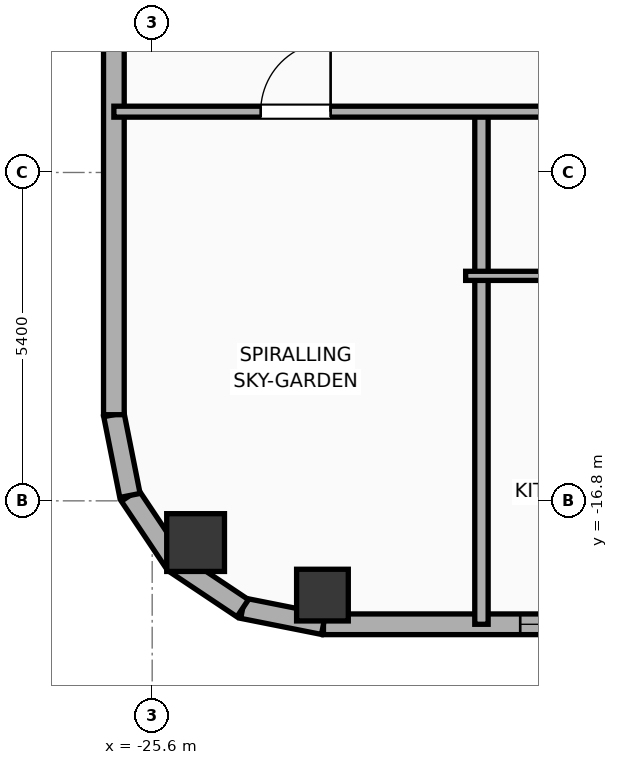
"""IFC4 building model, lengths in metres.
Left out: names, types, materials, properties, quantities, classifications, styles, units other than length and angle.
Written with IfcOpenShell. Run it as: python <this file> out.ifc"""

import sys

from ifc_helpers import new_model, si_unit, direction, frame, frame_2d, origin, origin_2d, place, context, subcontext, project, spatial, rectangle, hollow_rectangle, hollow_circle, extrude, element, fill, save


model = new_model("IFC4")
c1 = context("Model", 3, precision=1e-05, world=origin(), true_north=direction((0.0, 1.0)))
c2 = subcontext(c1, "Body", "Model", "MODEL_VIEW")
j1 = project(units=[si_unit("LENGTHUNIT", "METRE"), si_unit("PLANEANGLEUNIT", "RADIAN")], contexts=[c1])
p1 = place(None, origin())
s1 = spatial("IfcSite", under=j1, at=p1, CompositionType="ELEMENT")
p2 = place(p1, origin())
s2 = spatial("IfcBuilding", under=s1, at=p2, CompositionType="ELEMENT")
p3 = place(p2, frame((0.0, 0.0, 208.0)))
s3 = spatial("IfcBuildingStorey", under=s2, at=p3, CompositionType="ELEMENT", Elevation=208.0)
p4 = place(p3, frame((-22.8, -18.35, 0.0), z_axis=(0.0, 0.0, 1.0), x_axis=(1.0, 0.0, 0.0)))
e1 = element("IfcColumn", 1, at=p4, inside=s3, PredefinedType="COLUMN", context=c2, shape_type="SweptSolid", body=[
    extrude(hollow_rectangle(XDim=0.85, YDim=0.85, WallThickness=0.028, at=origin_2d()), origin(), (0.0, 0.0, 1.0), 3.9),
])
p5 = place(p3, frame((-24.886, -17.486, 0.0), z_axis=(0.0, 0.0, 1.0), x_axis=(1.0, 0.0, 0.0)))
e2 = element("IfcColumn", 2, at=p5, inside=s3, PredefinedType="COLUMN", context=c2, shape_type="SweptSolid", body=[
    extrude(hollow_circle(Radius=0.475, WallThickness=0.032, at=origin_2d()), origin(), (0.0, 0.0, 1.0), 3.9),
])
p6 = place(p3, frame((-13.861, -18.83, 0.0), z_axis=(0.0, 0.0, 1.0), x_axis=(-1.0, 0.0, 0.0)))
e3 = element("IfcWall", 3, at=p6, inside=s3, PredefinedType="ELEMENTEDWALL", context=c2, shape_type="SweptSolid", body=[
    extrude(rectangle(XDim=8.922, YDim=0.34, at=frame_2d((4.461, 0.0))), origin(), (0.0, 0.0, 1.0), 3.65),
])
p7 = place(p6, frame((1.769, 0.0, 0.75)))
e4 = element("IfcOpeningElement", 4, at=p7, cuts=e3, PredefinedType="OPENING", context=c2, shape_type="SweptSolid", body=[
    extrude(rectangle(XDim=1.2, YDim=2.05, at=frame_2d((0.6, 1.025))), frame((0.0, 0.18, 0.0), z_axis=(0.0, -1.0, 0.0), x_axis=(1.0, 0.0, 0.0)), (0.0, 0.0, 1.0), 0.36),
])
p8 = place(p6, frame((4.486, 0.0, 0.75)))
e5 = element("IfcOpeningElement", 5, at=p8, cuts=e3, PredefinedType="OPENING", context=c2, shape_type="SweptSolid", body=[
    extrude(rectangle(XDim=1.2, YDim=2.05, at=frame_2d((0.6, 1.025))), frame((0.0, 0.18, 0.0), z_axis=(0.0, -1.0, 0.0), x_axis=(1.0, 0.0, 0.0)), (0.0, 0.0, 1.0), 0.36),
])
p9 = place(p3, frame((-22.783, -18.83, 0.0), z_axis=(0.0, 0.0, 1.0), x_axis=(-0.980788153188, 0.195075878998, 0.0)))
e6 = element("IfcWall", 6, at=p9, inside=s3, PredefinedType="ELEMENTEDWALL", context=c2, shape_type="SweptSolid", body=[
    extrude(rectangle(XDim=1.354, YDim=0.34, at=frame_2d((0.677, 0.0))), origin(), (0.0, 0.0, 1.0), 3.65),
])
p10 = place(p3, frame((-24.111, -18.566, 0.0), z_axis=(0.0, 0.0, 1.0), x_axis=(-0.831403586725, 0.555669034571, 0.0)))
e7 = element("IfcWall", 7, at=p10, inside=s3, PredefinedType="ELEMENTEDWALL", context=c2, shape_type="SweptSolid", body=[
    extrude(rectangle(XDim=1.337, YDim=0.34, at=frame_2d((0.668, 0.0))), origin(), (0.0, 0.0, 1.0), 3.65),
])
p11 = place(p3, frame((-25.223, -17.823, 0.0), z_axis=(0.0, 0.0, 1.0), x_axis=(-0.555584683399, 0.831459956686, 0.0)))
e8 = element("IfcWall", 8, at=p11, inside=s3, PredefinedType="ELEMENTEDWALL", context=c2, shape_type="SweptSolid", body=[
    extrude(rectangle(XDim=1.337, YDim=0.34, at=frame_2d((0.668, 0.0))), origin(), (0.0, 0.0, 1.0), 3.65),
])
p12 = place(p3, frame((-25.966, -16.711, 0.0), z_axis=(0.0, 0.0, 1.0), x_axis=(-0.195110379894, 0.98078129043, 0.0)))
e9 = element("IfcWall", 9, at=p12, inside=s3, PredefinedType="ELEMENTEDWALL", context=c2, shape_type="SweptSolid", body=[
    extrude(rectangle(XDim=1.354, YDim=0.34, at=frame_2d((0.677, 0.0))), origin(), (0.0, 0.0, 1.0), 3.65),
])
p13 = place(p3, frame((-26.23, -15.383, 0.0), z_axis=(0.0, 0.0, 1.0), x_axis=(0.0, 1.0, 0.0)))
e10 = element("IfcWall", 10, at=p13, inside=s3, PredefinedType="ELEMENTEDWALL", context=c2, shape_type="SweptSolid", body=[
    extrude(rectangle(XDim=31.967, YDim=0.34, at=frame_2d((15.983, 0.0))), origin(), (0.0, 0.0, 1.0), 3.65),
])
p14 = place(p13, frame((29.415, 0.0, 0.75)))
e11 = element("IfcOpeningElement", 11, at=p14, cuts=e10, PredefinedType="OPENING", context=c2, shape_type="SweptSolid", body=[
    extrude(rectangle(XDim=1.2, YDim=2.05, at=frame_2d((0.6, 1.025))), frame((0.0, 0.18, 0.0), z_axis=(0.0, -1.0, 0.0), x_axis=(1.0, 0.0, 0.0)), (0.0, 0.0, 1.0), 0.36),
])
p15 = place(p13, frame((20.578, 0.0, 0.75)))
e12 = element("IfcOpeningElement", 12, at=p15, cuts=e10, PredefinedType="OPENING", context=c2, shape_type="SweptSolid", body=[
    extrude(rectangle(XDim=1.2, YDim=2.05, at=frame_2d((0.6, 1.025))), frame((0.0, 0.18, 0.0), z_axis=(0.0, -1.0, 0.0), x_axis=(1.0, 0.0, 0.0)), (0.0, 0.0, 1.0), 0.36),
])
p16 = place(p13, frame((9.803, 0.0, 0.75)))
e13 = element("IfcOpeningElement", 13, at=p16, cuts=e10, PredefinedType="OPENING", context=c2, shape_type="SweptSolid", body=[
    extrude(rectangle(XDim=1.2, YDim=2.05, at=frame_2d((0.6, 1.025))), frame((0.0, 0.18, 0.0), z_axis=(0.0, -1.0, 0.0), x_axis=(1.0, 0.0, 0.0)), (0.0, 0.0, 1.0), 0.36),
])
p17 = place(p3, frame((-20.185, -18.83, 0.0), z_axis=(0.0, 0.0, 1.0), x_axis=(0.0, 1.0, 0.0)))
e14 = element("IfcWall", 14, at=p17, inside=s3, PredefinedType="PARTITIONING", context=c2, shape_type="SweptSolid", body=[
    extrude(rectangle(XDim=8.51, YDim=0.22, at=frame_2d((4.255, 0.0))), origin(), (0.0, 0.0, 1.0), 3.09),
])
p18 = place(p3, frame((-20.445, -13.1, 0.0), z_axis=(0.0, 0.0, 1.0), x_axis=(1.0, 0.0, 0.0)))
e15 = element("IfcWall", 15, at=p18, inside=s3, PredefinedType="PLUMBINGWALL", context=c2, shape_type="SweptSolid", body=[
    extrude(rectangle(XDim=2.815, YDim=0.15, at=frame_2d((1.408, 0.0))), origin(), (0.0, 0.0, 1.0), 3.65),
])
p19 = place(p3, frame((-26.23, -10.4, 0.0), z_axis=(0.0, 0.0, 1.0), x_axis=(1.0, 0.0, 0.0)))
e16 = element("IfcWall", 16, at=p19, inside=s3, PredefinedType="PARTITIONING", context=c2, shape_type="SweptSolid", body=[
    extrude(rectangle(XDim=18.15, YDim=0.18, at=frame_2d((9.075, 0.0))), origin(), (0.0, 0.0, 1.0), 3.65),
])
p20 = place(p19, frame((2.414, 0.0, 0.0)))
e17 = element("IfcOpeningElement", 17, at=p20, cuts=e16, PredefinedType="OPENING", context=c2, shape_type="SweptSolid", body=[
    extrude(rectangle(XDim=1.15, YDim=2.05, at=frame_2d((0.575, 1.025))), frame((0.0, 0.1, 0.0), z_axis=(0.0, -1.0, 0.0), x_axis=(1.0, 0.0, 0.0)), (0.0, 0.0, 1.0), 0.2),
])
p21 = place(p19, frame((9.703, 0.0, 0.0)))
e18 = element("IfcOpeningElement", 18, at=p21, cuts=e16, PredefinedType="OPENING", context=c2, shape_type="SweptSolid", body=[
    extrude(rectangle(XDim=1.15, YDim=2.05, at=frame_2d((0.575, 1.025))), frame((0.0, 0.1, 0.0), z_axis=(0.0, -1.0, 0.0), x_axis=(1.0, 0.0, 0.0)), (0.0, 0.0, 1.0), 0.2),
])
p22 = place(p19, frame((14.792, 0.0, 0.0)))
e19 = element("IfcOpeningElement", 19, at=p22, cuts=e16, PredefinedType="OPENING", context=c2, shape_type="SweptSolid", body=[
    extrude(rectangle(XDim=0.9, YDim=2.05, at=frame_2d((0.45, 1.025))), frame((0.0, 0.1, 0.0), z_axis=(0.0, -1.0, 0.0), x_axis=(1.0, 0.0, 0.0)), (0.0, 0.0, 1.0), 0.2),
])
p23 = place(p8, origin())
e20 = element("IfcWindow", 20, at=p23, inside=s3, PartitioningType="SINGLE_PANEL", PredefinedType="WINDOW", context=c2, shape_type="SweptSolid", body=[
    extrude(rectangle(XDim=1.2, YDim=2.05, at=frame_2d((0.6, 1.025))), frame((0.0, 0.03, 0.0), z_axis=(0.0, -1.0, 0.0), x_axis=(1.0, 0.0, 0.0)), (0.0, 0.0, 1.0), 0.06),
])
fill(e5, e20)
p24 = place(p20, origin())
e21 = element("IfcDoor", 21, at=p24, inside=s3, OperationType="SINGLE_SWING_RIGHT", PredefinedType="DOOR", context=c2, shape_type="SweptSolid", body=[
    extrude(rectangle(XDim=1.15, YDim=2.05, at=frame_2d((0.575, 1.025))), frame((0.0, 0.025, 0.0), z_axis=(0.0, -1.0, 0.0), x_axis=(1.0, 0.0, 0.0)), (0.0, 0.0, 1.0), 0.05),
])
fill(e17, e21)
save(model, sys.argv[1])
